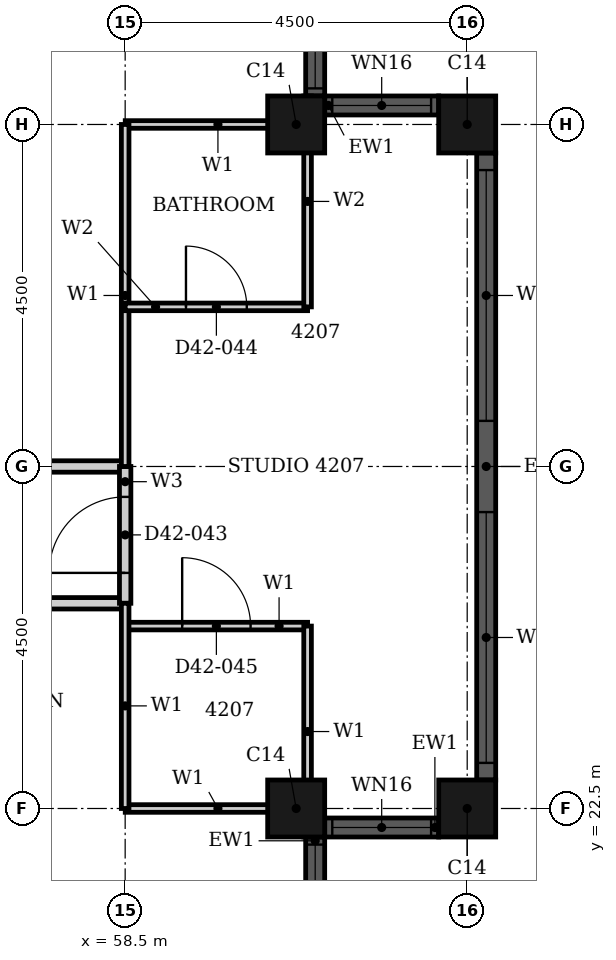
"""IFC4 building model, lengths in metres.
Left out: names, types, materials, properties, quantities, classifications, styles, units other than length and angle.
Written with IfcOpenShell. Run it as: python <this file> out.ifc"""

import sys

from ifc_helpers import new_model, si_unit, direction, frame, frame_2d, origin, origin_2d, place, context, subcontext, project, spatial, rectangle, hollow_rectangle, extrude, element, fill, save


model = new_model("IFC4")
c1 = context("Model", 3, precision=1e-05, world=origin(), true_north=direction((0.0, 1.0)))
c2 = subcontext(c1, "Body", "Model", "MODEL_VIEW")
j1 = project(units=[si_unit("LENGTHUNIT", "METRE"), si_unit("PLANEANGLEUNIT", "RADIAN")], contexts=[c1])
p1 = place(None, origin())
s1 = spatial("IfcSite", under=j1, at=p1, CompositionType="ELEMENT")
p2 = place(p1, origin())
s2 = spatial("IfcBuilding", under=s1, at=p2, CompositionType="ELEMENT")
p3 = place(p2, frame((0.0, 0.0, 169.1)))
s3 = spatial("IfcBuildingStorey", under=s2, at=p3, CompositionType="ELEMENT", Elevation=169.1)
for number, where, z_axis, x_axis in (
    (1, (60.75, 22.5, 0.0), (0.0, 0.0, 1.0), (1.0, 0.0, 0.0)),
    (2, (63.0, 22.5, 0.0), (0.0, 0.0, 1.0), (1.0, 0.0, 0.0)),
    (3, (63.0, 31.5, 0.0), (0.0, 0.0, 1.0), (1.0, 0.0, 0.0)),
    (4, (60.75, 31.5, 0.0), (0.0, 0.0, 1.0), (1.0, 0.0, 0.0)),
):
    element("IfcColumn", number, at=place(p3, frame(where, z_axis=z_axis, x_axis=x_axis)), inside=s3, PredefinedType="COLUMN", context=c2, shape_type="SweptSolid", body=[
        extrude(hollow_rectangle(XDim=0.75, YDim=0.75, WallThickness=0.024, at=origin_2d()), origin(), (0.0, 0.0, 1.0), 3.7),
    ])
p4 = place(p3, frame((61.0, 20.625, 0.0), z_axis=(0.0, 0.0, 1.0), x_axis=(0.0, 1.0, 0.0)))
e5 = element("IfcWall", 5, at=p4, inside=s3, PredefinedType="SOLIDWALL", context=c2, shape_type="SweptSolid", body=[
    extrude(rectangle(XDim=1.5, YDim=0.25, at=frame_2d((0.75, 0.0))), origin(), (0.0, 0.0, 1.0), 3.7),
])
p5 = place(p4, frame((0.1, 0.0, 0.9)))
e6 = element("IfcOpeningElement", 6, at=p5, cuts=e5, PredefinedType="OPENING", context=c2, shape_type="SweptSolid", body=[
    extrude(rectangle(XDim=1.3, YDim=1.85, at=frame_2d((0.65, 0.925))), frame((0.0, 0.135, 0.0), z_axis=(0.0, -1.0, 0.0), x_axis=(1.0, 0.0, 0.0)), (0.0, 0.0, 1.0), 0.27),
])
p6 = place(p3, frame((61.125, 22.25, 0.0), z_axis=(0.0, 0.0, 1.0), x_axis=(1.0, 0.0, 0.0)))
e7 = element("IfcWall", 7, at=p6, inside=s3, PredefinedType="SOLIDWALL", context=c2, shape_type="SweptSolid", body=[
    extrude(rectangle(XDim=1.5, YDim=0.25, at=frame_2d((0.75, 0.0))), origin(), (0.0, 0.0, 1.0), 3.7),
])
p7 = place(p6, frame((0.1, 0.0, 0.9)))
e8 = element("IfcOpeningElement", 8, at=p7, cuts=e7, PredefinedType="OPENING", context=c2, shape_type="SweptSolid", body=[
    extrude(rectangle(XDim=1.3, YDim=1.85, at=frame_2d((0.65, 0.925))), frame((0.0, 0.135, 0.0), z_axis=(0.0, -1.0, 0.0), x_axis=(1.0, 0.0, 0.0)), (0.0, 0.0, 1.0), 0.27),
])
p8 = place(p3, frame((63.25, 22.875, 0.0), z_axis=(0.0, 0.0, 1.0), x_axis=(0.0, 1.0, 0.0)))
e9 = element("IfcWall", 9, at=p8, inside=s3, PredefinedType="SOLIDWALL", context=c2, shape_type="SweptSolid", body=[
    extrude(rectangle(XDim=8.25, YDim=0.25, at=frame_2d((4.125, 0.0))), origin(), (0.0, 0.0, 1.0), 3.7),
])
p9 = place(p8, frame((0.225, 0.0, 0.45)))
e10 = element("IfcOpeningElement", 10, at=p9, cuts=e9, PredefinedType="OPENING", context=c2, shape_type="SweptSolid", body=[
    extrude(rectangle(XDim=3.3, YDim=2.3, at=frame_2d((1.65, 1.15))), frame((0.0, 0.135, 0.0), z_axis=(0.0, -1.0, 0.0), x_axis=(1.0, 0.0, 0.0)), (0.0, 0.0, 1.0), 0.27),
])
p10 = place(p8, frame((4.725, 0.0, 0.45)))
e11 = element("IfcOpeningElement", 11, at=p10, cuts=e9, PredefinedType="OPENING", context=c2, shape_type="SweptSolid", body=[
    extrude(rectangle(XDim=3.3, YDim=2.3, at=frame_2d((1.65, 1.15))), frame((0.0, 0.135, 0.0), z_axis=(0.0, -1.0, 0.0), x_axis=(1.0, 0.0, 0.0)), (0.0, 0.0, 1.0), 0.27),
])
p11 = place(p3, frame((62.625, 31.75, 0.0), z_axis=(0.0, 0.0, 1.0), x_axis=(-1.0, 0.0, 0.0)))
e12 = element("IfcWall", 12, at=p11, inside=s3, PredefinedType="SOLIDWALL", context=c2, shape_type="SweptSolid", body=[
    extrude(rectangle(XDim=1.5, YDim=0.25, at=frame_2d((0.75, 0.0))), origin(), (0.0, 0.0, 1.0), 3.7),
])
p12 = place(p11, frame((0.1, 0.0, 0.9)))
e13 = element("IfcOpeningElement", 13, at=p12, cuts=e12, PredefinedType="OPENING", context=c2, shape_type="SweptSolid", body=[
    extrude(rectangle(XDim=1.3, YDim=1.85, at=frame_2d((0.65, 0.925))), frame((0.0, 0.135, 0.0), z_axis=(0.0, -1.0, 0.0), x_axis=(1.0, 0.0, 0.0)), (0.0, 0.0, 1.0), 0.27),
])
p13 = place(p3, frame((61.0, 31.875, 0.0), z_axis=(0.0, 0.0, 1.0), x_axis=(0.0, 1.0, 0.0)))
e14 = element("IfcWall", 14, at=p13, inside=s3, PredefinedType="SOLIDWALL", context=c2, shape_type="SweptSolid", body=[
    extrude(rectangle(XDim=1.5, YDim=0.25, at=frame_2d((0.75, 0.0))), origin(), (0.0, 0.0, 1.0), 3.7),
])
p14 = place(p13, frame((0.1, 0.0, 0.9)))
e15 = element("IfcOpeningElement", 15, at=p14, cuts=e14, PredefinedType="OPENING", context=c2, shape_type="SweptSolid", body=[
    extrude(rectangle(XDim=1.3, YDim=1.85, at=frame_2d((0.65, 0.925))), frame((0.0, 0.135, 0.0), z_axis=(0.0, -1.0, 0.0), x_axis=(1.0, 0.0, 0.0)), (0.0, 0.0, 1.0), 0.27),
])
p15 = place(p3, frame((46.801, 25.2, 0.0), z_axis=(0.0, 0.0, 1.0), x_axis=(1.0, 0.0, 0.0)))
e16 = element("IfcWall", 16, at=p15, inside=s3, PredefinedType="PARTITIONING", context=c2, shape_type="SweptSolid", body=[
    extrude(rectangle(XDim=11.699, YDim=0.15, at=frame_2d((5.85, 0.0))), origin(), (0.0, 0.0, 1.0), 3.4),
])
p16 = place(p15, frame((6.698, 0.0, 0.0)))
e17 = element("IfcOpeningElement", 17, at=p16, cuts=e16, PredefinedType="OPENING", context=c2, shape_type="SweptSolid", body=[
    extrude(rectangle(XDim=1.0, YDim=2.1, at=frame_2d((0.5, 1.05))), frame((0.0, 0.085, 0.0), z_axis=(0.0, -1.0, 0.0), x_axis=(1.0, 0.0, 0.0)), (0.0, 0.0, 1.0), 0.17),
])
p17 = place(p3, frame((45.0, 27.0, 0.0), z_axis=(0.0, 0.0, 1.0), x_axis=(1.0, 0.0, 0.0)))
e18 = element("IfcWall", 18, at=p17, inside=s3, PredefinedType="PARTITIONING", context=c2, shape_type="SweptSolid", body=[
    extrude(rectangle(XDim=13.5, YDim=0.15, at=frame_2d((6.75, 0.0))), origin(), (0.0, 0.0, 1.0), 2.68),
])
p18 = place(p17, frame((7.15, 0.0, 0.0)))
e19 = element("IfcOpeningElement", 19, at=p18, cuts=e18, PredefinedType="OPENING", context=c2, shape_type="SweptSolid", body=[
    extrude(rectangle(XDim=1.0, YDim=2.1, at=frame_2d((0.5, 1.05))), frame((0.0, 0.085, 0.0), z_axis=(0.0, -1.0, 0.0), x_axis=(1.0, 0.0, 0.0)), (0.0, 0.0, 1.0), 0.17),
])
p19 = place(p3, frame((58.5, 25.2, 0.0), z_axis=(0.0, 0.0, 1.0), x_axis=(0.0, 1.0, 0.0)))
e20 = element("IfcWall", 20, at=p19, inside=s3, PredefinedType="PARTITIONING", context=c2, shape_type="SweptSolid", body=[
    extrude(rectangle(XDim=1.8, YDim=0.15, at=frame_2d((0.9, 0.0))), origin(), (0.0, 0.0, 1.0), 3.4),
])
p20 = place(p19, frame((0.4, 0.0, 0.0)))
e21 = element("IfcOpeningElement", 21, at=p20, cuts=e20, PredefinedType="OPENING", context=c2, shape_type="SweptSolid", body=[
    extrude(rectangle(XDim=1.0, YDim=2.2, at=frame_2d((0.5, 1.1))), frame((0.0, 0.085, 0.0), z_axis=(0.0, -1.0, 0.0), x_axis=(1.0, 0.0, 0.0)), (0.0, 0.0, 1.0), 0.17),
])
p21 = place(p3, frame((58.501, 22.5, 0.0), z_axis=(0.0, 0.0, 1.0), x_axis=(1.0, 0.0, 0.0)))
e22 = element("IfcWall", 22, at=p21, inside=s3, PredefinedType="PARTITIONING", context=c2, shape_type="SweptSolid", body=[
    extrude(rectangle(XDim=2.439, YDim=0.1, at=frame_2d((1.219, 0.0))), origin(), (0.0, 0.0, 1.0), 2.68),
])
p22 = place(p3, frame((58.5, 24.9, 0.0), z_axis=(0.0, 0.0, 1.0), x_axis=(1.0, 0.0, 0.0)))
e23 = element("IfcWall", 23, at=p22, inside=s3, PredefinedType="PARTITIONING", context=c2, shape_type="SweptSolid", body=[
    extrude(rectangle(XDim=2.4, YDim=0.1, at=frame_2d((1.2, 0.0))), origin(), (0.0, 0.0, 1.0), 3.4),
])
p23 = place(p22, frame((0.75, 0.0, 0.0)))
e24 = element("IfcOpeningElement", 24, at=p23, cuts=e23, PredefinedType="OPENING", context=c2, shape_type="SweptSolid", body=[
    extrude(rectangle(XDim=0.9, YDim=2.1, at=frame_2d((0.45, 1.05))), frame((0.0, 0.06, 0.0), z_axis=(0.0, -1.0, 0.0), x_axis=(1.0, 0.0, 0.0)), (0.0, 0.0, 1.0), 0.12),
])
p24 = place(p3, frame((58.501, 31.5, 0.0), z_axis=(0.0, 0.0, 1.0), x_axis=(1.0, 0.0, 0.0)))
e25 = element("IfcWall", 25, at=p24, inside=s3, PredefinedType="PARTITIONING", context=c2, shape_type="SweptSolid", body=[
    extrude(rectangle(XDim=2.439, YDim=0.1, at=frame_2d((1.219, 0.0))), origin(), (0.0, 0.0, 1.0), 2.68),
])
p25 = place(p3, frame((58.5, 27.0, 0.0), z_axis=(0.0, 0.0, 1.0), x_axis=(0.0, 1.0, 0.0)))
e26 = element("IfcWall", 26, at=p25, inside=s3, PredefinedType="PARTITIONING", context=c2, shape_type="SweptSolid", body=[
    extrude(rectangle(XDim=4.5, YDim=0.1, at=frame_2d((2.25, 0.0))), origin(), (0.0, 0.0, 1.0), 3.4),
])
p26 = place(p3, frame((58.5, 22.5, 0.0), z_axis=(0.0, 0.0, 1.0), x_axis=(0.0, 1.0, 0.0)))
e27 = element("IfcWall", 27, at=p26, inside=s3, PredefinedType="PARTITIONING", context=c2, shape_type="SweptSolid", body=[
    extrude(rectangle(XDim=2.7, YDim=0.1, at=frame_2d((1.35, 0.0))), origin(), (0.0, 0.0, 1.0), 3.4),
])
p27 = place(p3, frame((60.9, 22.125, 0.0), z_axis=(0.0, 0.0, 1.0), x_axis=(0.0, 1.0, 0.0)))
e28 = element("IfcWall", 28, at=p27, inside=s3, PredefinedType="PARTITIONING", context=c2, shape_type="SweptSolid", body=[
    extrude(rectangle(XDim=2.775, YDim=0.1, at=frame_2d((1.387, 0.0))), origin(), (0.0, 0.0, 1.0), 3.4),
])
p28 = place(p3, frame((58.5, 29.1, 0.0), z_axis=(0.0, 0.0, 1.0), x_axis=(1.0, 0.0, 0.0)))
e29 = element("IfcWall", 29, at=p28, inside=s3, PredefinedType="PARTITIONING", context=c2, shape_type="SweptSolid", body=[
    extrude(rectangle(XDim=2.4, YDim=0.1, at=frame_2d((1.2, 0.0))), origin(), (0.0, 0.0, 1.0), 3.4),
])
p29 = place(p28, frame((0.8, 0.0, 0.0)))
e30 = element("IfcOpeningElement", 30, at=p29, cuts=e29, PredefinedType="OPENING", context=c2, shape_type="SweptSolid", body=[
    extrude(rectangle(XDim=0.8, YDim=2.1, at=frame_2d((0.4, 1.05))), frame((0.0, 0.06, 0.0), z_axis=(0.0, -1.0, 0.0), x_axis=(1.0, 0.0, 0.0)), (0.0, 0.0, 1.0), 0.12),
])
p30 = place(p3, frame((60.9, 29.1, 0.0), z_axis=(0.0, 0.0, 1.0), x_axis=(0.0, 1.0, 0.0)))
e31 = element("IfcWall", 31, at=p30, inside=s3, PredefinedType="PARTITIONING", context=c2, shape_type="SweptSolid", body=[
    extrude(rectangle(XDim=2.775, YDim=0.1, at=frame_2d((1.387, 0.0))), origin(), (0.0, 0.0, 1.0), 3.4),
])
p31 = place(p5, origin())
e32 = element("IfcWindow", 32, at=p31, inside=s3, PartitioningType="SINGLE_PANEL", PredefinedType="WINDOW", context=c2, shape_type="SweptSolid", body=[
    extrude(rectangle(XDim=1.3, YDim=1.85, at=frame_2d((0.65, 0.925))), frame((0.0, 0.03, 0.0), z_axis=(0.0, -1.0, 0.0), x_axis=(1.0, 0.0, 0.0)), (0.0, 0.0, 1.0), 0.06),
])
fill(e6, e32)
p32 = place(p7, origin())
e33 = element("IfcWindow", 33, at=p32, inside=s3, PartitioningType="SINGLE_PANEL", PredefinedType="WINDOW", context=c2, shape_type="SweptSolid", body=[
    extrude(rectangle(XDim=1.3, YDim=1.85, at=frame_2d((0.65, 0.925))), frame((0.0, 0.03, 0.0), z_axis=(0.0, -1.0, 0.0), x_axis=(1.0, 0.0, 0.0)), (0.0, 0.0, 1.0), 0.06),
])
fill(e8, e33)
p33 = place(p9, origin())
e34 = element("IfcWindow", 34, at=p33, inside=s3, PartitioningType="SINGLE_PANEL", PredefinedType="WINDOW", context=c2, shape_type="SweptSolid", body=[
    extrude(rectangle(XDim=3.3, YDim=2.3, at=frame_2d((1.65, 1.15))), frame((0.0, 0.03, 0.0), z_axis=(0.0, -1.0, 0.0), x_axis=(1.0, 0.0, 0.0)), (0.0, 0.0, 1.0), 0.06),
])
fill(e10, e34)
p34 = place(p10, origin())
e35 = element("IfcWindow", 35, at=p34, inside=s3, PartitioningType="SINGLE_PANEL", PredefinedType="WINDOW", context=c2, shape_type="SweptSolid", body=[
    extrude(rectangle(XDim=3.3, YDim=2.3, at=frame_2d((1.65, 1.15))), frame((0.0, 0.03, 0.0), z_axis=(0.0, -1.0, 0.0), x_axis=(1.0, 0.0, 0.0)), (0.0, 0.0, 1.0), 0.06),
])
fill(e11, e35)
p35 = place(p12, origin())
e36 = element("IfcWindow", 36, at=p35, inside=s3, PartitioningType="SINGLE_PANEL", PredefinedType="WINDOW", context=c2, shape_type="SweptSolid", body=[
    extrude(rectangle(XDim=1.3, YDim=1.85, at=frame_2d((0.65, 0.925))), frame((0.0, 0.03, 0.0), z_axis=(0.0, -1.0, 0.0), x_axis=(1.0, 0.0, 0.0)), (0.0, 0.0, 1.0), 0.06),
])
fill(e13, e36)
p36 = place(p14, origin())
e37 = element("IfcWindow", 37, at=p36, inside=s3, PartitioningType="SINGLE_PANEL", PredefinedType="WINDOW", context=c2, shape_type="SweptSolid", body=[
    extrude(rectangle(XDim=1.3, YDim=1.85, at=frame_2d((0.65, 0.925))), frame((0.0, 0.03, 0.0), z_axis=(0.0, -1.0, 0.0), x_axis=(1.0, 0.0, 0.0)), (0.0, 0.0, 1.0), 0.06),
])
fill(e15, e37)
p37 = place(p20, origin())
e38 = element("IfcDoor", 38, at=p37, inside=s3, OperationType="SINGLE_SWING_RIGHT", PredefinedType="DOOR", context=c2, shape_type="SweptSolid", body=[
    extrude(rectangle(XDim=1.0, YDim=2.2, at=frame_2d((0.5, 1.1))), frame((0.0, 0.025, 0.0), z_axis=(0.0, -1.0, 0.0), x_axis=(1.0, 0.0, 0.0)), (0.0, 0.0, 1.0), 0.05),
])
fill(e21, e38)
p38 = place(p29, origin())
e39 = element("IfcDoor", 39, at=p38, inside=s3, OperationType="SINGLE_SWING_RIGHT", PredefinedType="DOOR", context=c2, shape_type="SweptSolid", body=[
    extrude(rectangle(XDim=0.8, YDim=2.1, at=frame_2d((0.4, 1.05))), frame((0.0, 0.025, 0.0), z_axis=(0.0, -1.0, 0.0), x_axis=(1.0, 0.0, 0.0)), (0.0, 0.0, 1.0), 0.05),
])
fill(e30, e39)
p39 = place(p23, origin())
e40 = element("IfcDoor", 40, at=p39, inside=s3, OperationType="SINGLE_SWING_LEFT", PredefinedType="DOOR", context=c2, shape_type="SweptSolid", body=[
    extrude(rectangle(XDim=0.9, YDim=2.1, at=frame_2d((0.45, 1.05))), frame((0.0, 0.025, 0.0), z_axis=(0.0, -1.0, 0.0), x_axis=(1.0, 0.0, 0.0)), (0.0, 0.0, 1.0), 0.05),
])
fill(e24, e40)
save(model, sys.argv[1])
